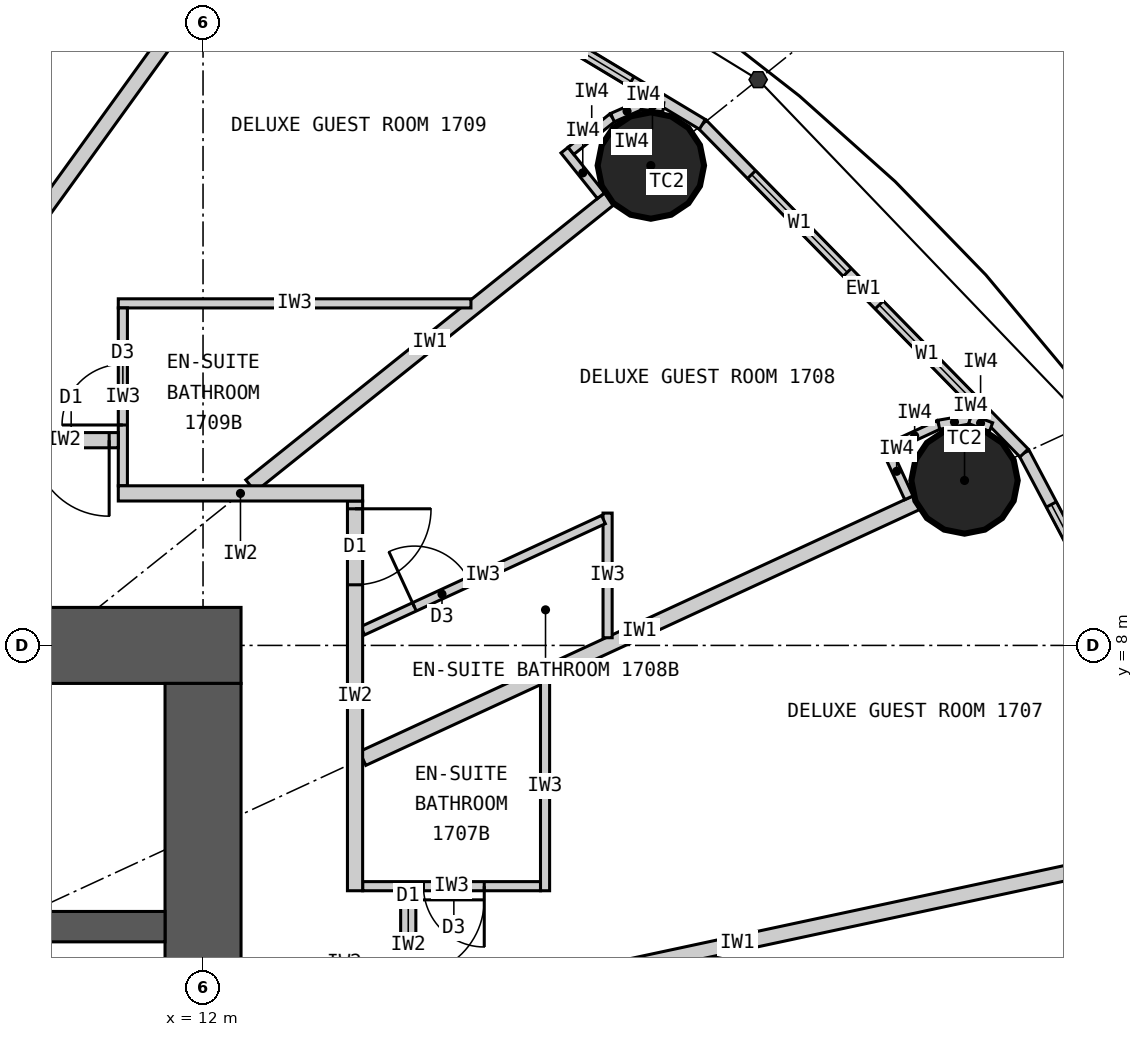
"""IFC4 building model, lengths in metres.
Left out: names, types, materials, properties, quantities, classifications, styles, units other than length and angle.
Written with IfcOpenShell. Run it as: python <this file> out.ifc"""

import sys

from ifc_helpers import new_model, si_unit, direction, frame, frame_2d, origin, origin_2d, place, context, subcontext, project, spatial, rectangle, circle, extrude, element, fill, save


model = new_model("IFC4")
c1 = context("Model", 3, precision=1e-05, world=origin(), true_north=direction((0.0, 1.0)))
c2 = subcontext(c1, "Body", "Model", "MODEL_VIEW")
j1 = project(units=[si_unit("LENGTHUNIT", "METRE"), si_unit("PLANEANGLEUNIT", "RADIAN")], contexts=[c1])
p1 = place(None, origin())
s1 = spatial("IfcSite", under=j1, at=p1, CompositionType="ELEMENT")
p2 = place(p1, origin())
s2 = spatial("IfcBuilding", under=s1, at=p2, CompositionType="ELEMENT")
p3 = place(p2, frame((0.0, 0.0, 70.5)))
s3 = spatial("IfcBuildingStorey", under=s2, at=p3, CompositionType="ELEMENT", Elevation=70.5)
for number, where, z_axis, x_axis in (
    (1, (22.019, 10.17, 0.0), (0.0, 0.0, 1.0), (1.0, 0.0, 0.0)),
    (2, (17.892, 14.313, 0.0), (0.0, 0.0, 1.0), (1.0, 0.0, 0.0)),
):
    element("IfcColumn", number, at=place(p3, frame(where, z_axis=z_axis, x_axis=x_axis)), inside=s3, PredefinedType="COLUMN", context=c2, shape_type="SweptSolid", body=[
        extrude(circle(Radius=0.7, at=origin_2d()), origin(), (0.0, 0.0, 1.0), 3.3),
    ])
p4 = place(p3, frame((-12.5, 8.0, 0.0), z_axis=(0.0, 0.0, 1.0), x_axis=(1.0, 0.0, 0.0)))
e3 = element("IfcWall", 3, at=p4, inside=s3, PredefinedType="SHEAR", context=c2, shape_type="SweptSolid", body=[
    extrude(rectangle(XDim=25.0, YDim=1.0, at=frame_2d((12.5, 0.0))), origin(), (0.0, 0.0, 1.0), 3.3),
])
p5 = place(p4, frame((11.2, 0.0, 0.0)))
e4 = element("IfcOpeningElement", 4, at=p5, cuts=e3, PredefinedType="OPENING", context=c2, shape_type="SweptSolid", body=[
    extrude(rectangle(XDim=1.2, YDim=2.2, at=frame_2d((0.6, 1.1))), frame((0.0, 0.51, 0.0), z_axis=(0.0, -1.0, 0.0), x_axis=(1.0, 0.0, 0.0)), (0.0, 0.0, 1.0), 1.02),
])
p6 = place(p4, frame((18.8, 0.0, 0.0)))
e5 = element("IfcOpeningElement", 5, at=p6, cuts=e3, PredefinedType="OPENING", context=c2, shape_type="SweptSolid", body=[
    extrude(rectangle(XDim=0.9, YDim=2.2, at=frame_2d((0.45, 1.1))), frame((0.0, 0.51, 0.0), z_axis=(0.0, -1.0, 0.0), x_axis=(1.0, 0.0, 0.0)), (0.0, 0.0, 1.0), 1.02),
])
p7 = place(p3, frame((12.0, -7.5, 0.0), z_axis=(0.0, 0.0, 1.0), x_axis=(0.0, 1.0, 0.0)))
e6 = element("IfcWall", 6, at=p7, inside=s3, PredefinedType="SHEAR", context=c2, shape_type="SweptSolid", body=[
    extrude(rectangle(XDim=15.0, YDim=1.0, at=frame_2d((7.5, 0.0))), origin(), (0.0, 0.0, 1.0), 3.3),
])
p8 = place(p7, frame((6.6, 0.0, 0.0)))
e7 = element("IfcOpeningElement", 7, at=p8, cuts=e6, PredefinedType="OPENING", context=c2, shape_type="SweptSolid", body=[
    extrude(rectangle(XDim=1.8, YDim=2.2, at=frame_2d((0.9, 1.1))), frame((0.0, 0.51, 0.0), z_axis=(0.0, -1.0, 0.0), x_axis=(1.0, 0.0, 0.0)), (0.0, 0.0, 1.0), 1.02),
])
p9 = place(p3, frame((-11.5, 4.3, 0.0), z_axis=(0.0, 0.0, 1.0), x_axis=(1.0, 0.0, 0.0)))
e8 = element("IfcWall", 8, at=p9, inside=s3, PredefinedType="SHEAR", context=c2, shape_type="SweptSolid", body=[
    extrude(rectangle(XDim=23.0, YDim=0.4, at=frame_2d((11.5, 0.0))), origin(), (0.0, 0.0, 1.0), 3.3),
])
p10 = place(p3, frame((25.482, 5.462, 0.0), z_axis=(0.0, 0.0, 1.0), x_axis=(-0.467296867008, 0.884100468321, 0.0)))
e9 = element("IfcWall", 9, at=p10, inside=s3, PredefinedType="ELEMENTEDWALL", context=c2, shape_type="SweptSolid", body=[
    extrude(rectangle(XDim=5.734, YDim=0.15, at=frame_2d((2.867, 0.0))), origin(), (0.0, 0.0, 1.0), 3.12),
])
p11 = place(p10, frame((0.767, 0.0, 0.9)))
e10 = element("IfcOpeningElement", 10, at=p11, cuts=e9, PredefinedType="OPENING", context=c2, shape_type="SweptSolid", body=[
    extrude(rectangle(XDim=1.8, YDim=1.9, at=frame_2d((0.9, 0.95))), frame((0.0, 0.085, 0.0), z_axis=(0.0, -1.0, 0.0), x_axis=(1.0, 0.0, 0.0)), (0.0, 0.0, 1.0), 0.17),
])
p12 = place(p10, frame((3.167, 0.0, 0.9)))
e11 = element("IfcOpeningElement", 11, at=p12, cuts=e9, PredefinedType="OPENING", context=c2, shape_type="SweptSolid", body=[
    extrude(rectangle(XDim=1.8, YDim=1.9, at=frame_2d((0.9, 0.95))), frame((0.0, 0.085, 0.0), z_axis=(0.0, -1.0, 0.0), x_axis=(1.0, 0.0, 0.0)), (0.0, 0.0, 1.0), 0.17),
])
p13 = place(p3, frame((22.803, 10.532, 0.0), z_axis=(0.0, 0.0, 1.0), x_axis=(-0.699602905915, 0.714531856557, 0.0)))
e12 = element("IfcWall", 12, at=p13, inside=s3, PredefinedType="ELEMENTEDWALL", context=c2, shape_type="SweptSolid", body=[
    extrude(rectangle(XDim=6.051, YDim=0.15, at=frame_2d((3.025, 0.0))), origin(), (0.0, 0.0, 1.0), 3.12),
])
p14 = place(p13, frame((0.926, 0.0, 0.9)))
e13 = element("IfcOpeningElement", 13, at=p14, cuts=e12, PredefinedType="OPENING", context=c2, shape_type="SweptSolid", body=[
    extrude(rectangle(XDim=1.8, YDim=1.9, at=frame_2d((0.9, 0.95))), frame((0.0, 0.085, 0.0), z_axis=(0.0, -1.0, 0.0), x_axis=(1.0, 0.0, 0.0)), (0.0, 0.0, 1.0), 0.17),
])
p15 = place(p13, frame((3.325, 0.0, 0.9)))
e14 = element("IfcOpeningElement", 14, at=p15, cuts=e12, PredefinedType="OPENING", context=c2, shape_type="SweptSolid", body=[
    extrude(rectangle(XDim=1.8, YDim=1.9, at=frame_2d((0.9, 0.95))), frame((0.0, 0.085, 0.0), z_axis=(0.0, -1.0, 0.0), x_axis=(1.0, 0.0, 0.0)), (0.0, 0.0, 1.0), 0.17),
])
p16 = place(p3, frame((18.57, 14.856, 0.0), z_axis=(0.0, 0.0, 1.0), x_axis=(-0.856983180864, 0.515344377787, 0.0)))
e15 = element("IfcWall", 15, at=p16, inside=s3, PredefinedType="ELEMENTEDWALL", context=c2, shape_type="SweptSolid", body=[
    extrude(rectangle(XDim=6.386, YDim=0.15, at=frame_2d((3.193, 0.0))), origin(), (0.0, 0.0, 1.0), 3.12),
])
p17 = place(p16, frame((1.093, 0.0, 0.9)))
e16 = element("IfcOpeningElement", 16, at=p17, cuts=e15, PredefinedType="OPENING", context=c2, shape_type="SweptSolid", body=[
    extrude(rectangle(XDim=1.8, YDim=1.9, at=frame_2d((0.9, 0.95))), frame((0.0, 0.085, 0.0), z_axis=(0.0, -1.0, 0.0), x_axis=(1.0, 0.0, 0.0)), (0.0, 0.0, 1.0), 0.17),
])
p18 = place(p16, frame((3.493, 0.0, 0.9)))
e17 = element("IfcOpeningElement", 17, at=p18, cuts=e15, PredefinedType="OPENING", context=c2, shape_type="SweptSolid", body=[
    extrude(rectangle(XDim=1.8, YDim=1.9, at=frame_2d((0.9, 0.95))), frame((0.0, 0.085, 0.0), z_axis=(0.0, -1.0, 0.0), x_axis=(1.0, 0.0, 0.0)), (0.0, 0.0, 1.0), 0.17),
])
p19 = place(p3, frame((14.1, 3.022, 0.0), z_axis=(0.0, 0.0, 1.0), x_axis=(0.977790014929, 0.209586943072, 0.0)))
e18 = element("IfcWall", 18, at=p19, inside=s3, PredefinedType="PARTITIONING", context=c2, shape_type="SweptSolid", body=[
    extrude(rectangle(XDim=10.087, YDim=0.2, at=frame_2d((5.043, 0.0))), origin(), (0.0, 0.0, 1.0), 2.32),
])
p20 = place(p3, frame((14.1, 6.512, 0.0), z_axis=(0.0, 0.0, 1.0), x_axis=(0.907832871056, 0.419332181247, 0.0)))
e19 = element("IfcWall", 19, at=p20, inside=s3, PredefinedType="PARTITIONING", context=c2, shape_type="SweptSolid", body=[
    extrude(rectangle(XDim=8.023, YDim=0.2, at=frame_2d((4.011, 0.0))), origin(), (0.0, 0.0, 1.0), 2.32),
])
p21 = place(p3, frame((12.625, 10.1, 0.0), z_axis=(0.0, 0.0, 1.0), x_axis=(0.780892451574, 0.624665493744, 0.0)))
e20 = element("IfcWall", 20, at=p21, inside=s3, PredefinedType="PARTITIONING", context=c2, shape_type="SweptSolid", body=[
    extrude(rectangle(XDim=6.045, YDim=0.2, at=frame_2d((3.022, 0.0))), origin(), (0.0, 0.0, 1.0), 2.32),
])
p22 = place(p3, frame((7.289, 10.1, 0.0), z_axis=(0.0, 0.0, 1.0), x_axis=(0.585198353053, 0.810890182197, 0.0)))
e21 = element("IfcWall", 21, at=p22, inside=s3, PredefinedType="PARTITIONING", context=c2, shape_type="SweptSolid", body=[
    extrude(rectangle(XDim=8.36, YDim=0.2, at=frame_2d((4.18, 0.0))), origin(), (0.0, 0.0, 1.0), 2.32),
])
p23 = place(p3, frame((16.5, 7.521, 0.0), z_axis=(0.0, 0.0, 1.0), x_axis=(0.0, -1.0, 0.0)))
e22 = element("IfcWall", 22, at=p23, inside=s3, PredefinedType="PARTITIONING", context=c2, shape_type="SweptSolid", body=[
    extrude(rectangle(XDim=2.749, YDim=0.12, at=frame_2d((1.374, 0.0))), origin(), (0.0, 0.0, 1.0), 3.12),
])
p24 = place(p3, frame((14.1, 4.833, 0.0), z_axis=(0.0, 0.0, 1.0), x_axis=(1.0, 0.0, 0.0)))
e23 = element("IfcWall", 23, at=p24, inside=s3, PredefinedType="PARTITIONING", context=c2, shape_type="SweptSolid", body=[
    extrude(rectangle(XDim=2.34, YDim=0.12, at=frame_2d((1.17, 0.0))), origin(), (0.0, 0.0, 1.0), 3.12),
])
p25 = place(p24, frame((0.8, 0.0, 0.0)))
e24 = element("IfcOpeningElement", 24, at=p25, cuts=e23, PredefinedType="OPENING", context=c2, shape_type="SweptSolid", body=[
    extrude(rectangle(XDim=0.8, YDim=2.1, at=frame_2d((0.4, 1.05))), frame((0.0, 0.07, 0.0), z_axis=(0.0, -1.0, 0.0), x_axis=(1.0, 0.0, 0.0)), (0.0, 0.0, 1.0), 0.14),
])
p26 = place(p3, frame((17.323, 8.101, 0.0), z_axis=(0.0, 0.0, 1.0), x_axis=(0.0, 1.0, 0.0)))
e25 = element("IfcWall", 25, at=p26, inside=s3, PredefinedType="PARTITIONING", context=c2, shape_type="SweptSolid", body=[
    extrude(rectangle(XDim=1.64, YDim=0.12, at=frame_2d((0.82, 0.0))), origin(), (0.0, 0.0, 1.0), 3.12),
])
p27 = place(p3, frame((14.1, 8.193, 0.0), z_axis=(0.0, 0.0, 1.0), x_axis=(0.907836493557, 0.419324338628, 0.0)))
e26 = element("IfcWall", 26, at=p27, inside=s3, PredefinedType="PARTITIONING", context=c2, shape_type="SweptSolid", body=[
    extrude(rectangle(XDim=3.49, YDim=0.12, at=frame_2d((1.745, 0.0))), origin(), (0.0, 0.0, 1.0), 3.12),
])
p28 = place(p27, frame((0.75, 0.0, 0.0)))
e27 = element("IfcOpeningElement", 27, at=p28, cuts=e26, PredefinedType="OPENING", context=c2, shape_type="SweptSolid", body=[
    extrude(rectangle(XDim=0.8, YDim=2.1, at=frame_2d((0.4, 1.05))), frame((0.0, 0.07, 0.0), z_axis=(0.0, -1.0, 0.0), x_axis=(1.0, 0.0, 0.0)), (0.0, 0.0, 1.0), 0.14),
])
p29 = place(p3, frame((15.525, 12.5, 0.0), z_axis=(0.0, 0.0, 1.0), x_axis=(-1.0, 0.0, 0.0)))
e28 = element("IfcWall", 28, at=p29, inside=s3, PredefinedType="PARTITIONING", context=c2, shape_type="SweptSolid", body=[
    extrude(rectangle(XDim=4.64, YDim=0.12, at=frame_2d((2.32, 0.0))), origin(), (0.0, 0.0, 1.0), 3.12),
])
p30 = place(p3, frame((10.945, 10.1, 0.0), z_axis=(0.0, 0.0, 1.0), x_axis=(0.0, 1.0, 0.0)))
e29 = element("IfcWall", 29, at=p30, inside=s3, PredefinedType="PARTITIONING", context=c2, shape_type="SweptSolid", body=[
    extrude(rectangle(XDim=2.34, YDim=0.12, at=frame_2d((1.17, 0.0))), origin(), (0.0, 0.0, 1.0), 3.12),
])
p31 = place(p30, frame((0.8, 0.0, 0.0)))
e30 = element("IfcOpeningElement", 30, at=p31, cuts=e29, PredefinedType="OPENING", context=c2, shape_type="SweptSolid", body=[
    extrude(rectangle(XDim=0.8, YDim=2.1, at=frame_2d((0.4, 1.05))), frame((0.0, 0.07, 0.0), z_axis=(0.0, -1.0, 0.0), x_axis=(1.0, 0.0, 0.0)), (0.0, 0.0, 1.0), 0.14),
])
p32 = place(p3, frame((14.7, 3.333, 0.0), z_axis=(0.0, 0.0, 1.0), x_axis=(0.0, 1.0, 0.0)))
e31 = element("IfcWall", 31, at=p32, inside=s3, PredefinedType="PARTITIONING", context=c2, shape_type="SweptSolid", body=[
    extrude(rectangle(XDim=1.44, YDim=0.2, at=frame_2d((0.72, 0.0))), origin(), (0.0, 0.0, 1.0), 3.12),
])
p33 = place(p32, frame((0.32, 0.0, 0.0)))
e32 = element("IfcOpeningElement", 32, at=p33, cuts=e31, PredefinedType="OPENING", context=c2, shape_type="SweptSolid", body=[
    extrude(rectangle(XDim=1.0, YDim=2.2, at=frame_2d((0.5, 1.1))), frame((0.0, 0.11, 0.0), z_axis=(0.0, -1.0, 0.0), x_axis=(1.0, 0.0, 0.0)), (0.0, 0.0, 1.0), 0.22),
])
p34 = place(p3, frame((9.445, 10.7, 0.0), z_axis=(0.0, 0.0, 1.0), x_axis=(1.0, 0.0, 0.0)))
e33 = element("IfcWall", 33, at=p34, inside=s3, PredefinedType="PARTITIONING", context=c2, shape_type="SweptSolid", body=[
    extrude(rectangle(XDim=1.44, YDim=0.2, at=frame_2d((0.72, 0.0))), origin(), (0.0, 0.0, 1.0), 3.12),
])
p35 = place(p34, frame((0.32, 0.0, 0.0)))
e34 = element("IfcOpeningElement", 34, at=p35, cuts=e33, PredefinedType="OPENING", context=c2, shape_type="SweptSolid", body=[
    extrude(rectangle(XDim=1.0, YDim=2.2, at=frame_2d((0.5, 1.1))), frame((0.0, 0.11, 0.0), z_axis=(0.0, -1.0, 0.0), x_axis=(1.0, 0.0, 0.0)), (0.0, 0.0, 1.0), 0.22),
])
p36 = place(p3, frame((14.0, 4.772, 0.0), z_axis=(0.0, 0.0, 1.0), x_axis=(0.0, 1.0, 0.0)))
e35 = element("IfcWall", 35, at=p36, inside=s3, PredefinedType="PARTITIONING", context=c2, shape_type="SweptSolid", body=[
    extrude(rectangle(XDim=5.127, YDim=0.2, at=frame_2d((2.564, 0.0))), origin(), (0.0, 0.0, 1.0), 3.12),
])
p37 = place(p36, frame((4.025, 0.0, 0.0)))
e36 = element("IfcOpeningElement", 36, at=p37, cuts=e35, PredefinedType="OPENING", context=c2, shape_type="SweptSolid", body=[
    extrude(rectangle(XDim=1.0, YDim=2.2, at=frame_2d((0.5, 1.1))), frame((0.0, 0.11, 0.0), z_axis=(0.0, -1.0, 0.0), x_axis=(1.0, 0.0, 0.0)), (0.0, 0.0, 1.0), 0.22),
])
p38 = place(p3, frame((10.885, 10.0, 0.0), z_axis=(0.0, 0.0, 1.0), x_axis=(1.0, 0.0, 0.0)))
e37 = element("IfcWall", 37, at=p38, inside=s3, PredefinedType="PARTITIONING", context=c2, shape_type="SweptSolid", body=[
    extrude(rectangle(XDim=3.215, YDim=0.2, at=frame_2d((1.607, 0.0))), origin(), (0.0, 0.0, 1.0), 3.12),
])
p39 = place(p3, frame((21.287, 9.942, 0.0), z_axis=(0.0, 0.0, 1.0), x_axis=(-0.419259891039, 0.907866258744, 0.0)))
e38 = element("IfcWall", 38, at=p39, inside=s3, PredefinedType="PARTITIONING", context=c2, shape_type="SweptSolid", body=[
    extrude(rectangle(XDim=0.768, YDim=0.12, at=frame_2d((0.384, 0.0))), origin(), (0.0, 0.0, 1.0), 3.12),
])
p40 = place(p3, frame((21.045, 10.61, 0.0), z_axis=(0.0, 0.0, 1.0), x_axis=(0.907877701396, 0.419235112208, 0.0)))
e39 = element("IfcWall", 39, at=p40, inside=s3, PredefinedType="PARTITIONING", context=c2, shape_type="SweptSolid", body=[
    extrude(rectangle(XDim=0.7, YDim=0.12, at=frame_2d((0.35, 0.0))), origin(), (0.0, 0.0, 1.0), 3.12),
])
p41 = place(p3, frame((21.68, 10.903, 0.0), z_axis=(0.0, 0.0, 1.0), x_axis=(0.985446622073, 0.169985161247, 0.0)))
e40 = element("IfcWall", 40, at=p41, inside=s3, PredefinedType="PARTITIONING", context=c2, shape_type="SweptSolid", body=[
    extrude(rectangle(XDim=0.418, YDim=0.12, at=frame_2d((0.209, 0.0))), origin(), (0.0, 0.0, 1.0), 3.12),
])
p42 = place(p3, frame((22.092, 10.974, 0.0), z_axis=(0.0, 0.0, 1.0), x_axis=(0.938428160676, -0.345474437912, 0.0)))
e41 = element("IfcWall", 41, at=p42, inside=s3, PredefinedType="PARTITIONING", context=c2, shape_type="SweptSolid", body=[
    extrude(rectangle(XDim=0.294, YDim=0.12, at=frame_2d((0.147, 0.0))), origin(), (0.0, 0.0, 1.0), 3.12),
])
p43 = place(p3, frame((17.236, 13.917, 0.0), z_axis=(0.0, 0.0, 1.0), x_axis=(-0.624695047554, 0.780868809443, 0.0)))
e42 = element("IfcWall", 42, at=p43, inside=s3, PredefinedType="PARTITIONING", context=c2, shape_type="SweptSolid", body=[
    extrude(rectangle(XDim=0.768, YDim=0.12, at=frame_2d((0.384, 0.0))), origin(), (0.0, 0.0, 1.0), 3.12),
])
p44 = place(p3, frame((16.841, 14.507, 0.0), z_axis=(0.0, 0.0, 1.0), x_axis=(0.780902834923, 0.62465251333, 0.0)))
e43 = element("IfcWall", 43, at=p44, inside=s3, PredefinedType="PARTITIONING", context=c2, shape_type="SweptSolid", body=[
    extrude(rectangle(XDim=0.7, YDim=0.12, at=frame_2d((0.35, 0.0))), origin(), (0.0, 0.0, 1.0), 3.12),
])
p45 = place(p3, frame((17.387, 14.944, 0.0), z_axis=(0.0, 0.0, 1.0), x_axis=(0.916036698064, 0.401094462441, 0.0)))
e44 = element("IfcWall", 44, at=p45, inside=s3, PredefinedType="PARTITIONING", context=c2, shape_type="SweptSolid", body=[
    extrude(rectangle(XDim=0.418, YDim=0.12, at=frame_2d((0.209, 0.0))), origin(), (0.0, 0.0, 1.0), 3.12),
])
p46 = place(p3, frame((17.77, 15.112, 0.0), z_axis=(0.0, 0.0, 1.0), x_axis=(0.993904401174, -0.110245368731, 0.0)))
e45 = element("IfcWall", 45, at=p46, inside=s3, PredefinedType="PARTITIONING", context=c2, shape_type="SweptSolid", body=[
    extrude(rectangle(XDim=0.288, YDim=0.12, at=frame_2d((0.144, 0.0))), origin(), (0.0, 0.0, 1.0), 3.12),
])
p47 = place(p12, origin())
e46 = element("IfcWindow", 46, at=p47, inside=s3, PartitioningType="SINGLE_PANEL", PredefinedType="WINDOW", context=c2, shape_type="SweptSolid", body=[
    extrude(rectangle(XDim=1.8, YDim=1.9, at=frame_2d((0.9, 0.95))), frame((0.0, 0.03, 0.0), z_axis=(0.0, -1.0, 0.0), x_axis=(1.0, 0.0, 0.0)), (0.0, 0.0, 1.0), 0.06),
])
fill(e11, e46)
p48 = place(p14, origin())
e47 = element("IfcWindow", 47, at=p48, inside=s3, PartitioningType="SINGLE_PANEL", PredefinedType="WINDOW", context=c2, shape_type="SweptSolid", body=[
    extrude(rectangle(XDim=1.8, YDim=1.9, at=frame_2d((0.9, 0.95))), frame((0.0, 0.03, 0.0), z_axis=(0.0, -1.0, 0.0), x_axis=(1.0, 0.0, 0.0)), (0.0, 0.0, 1.0), 0.06),
])
fill(e13, e47)
p49 = place(p15, origin())
e48 = element("IfcWindow", 48, at=p49, inside=s3, PartitioningType="SINGLE_PANEL", PredefinedType="WINDOW", context=c2, shape_type="SweptSolid", body=[
    extrude(rectangle(XDim=1.8, YDim=1.9, at=frame_2d((0.9, 0.95))), frame((0.0, 0.03, 0.0), z_axis=(0.0, -1.0, 0.0), x_axis=(1.0, 0.0, 0.0)), (0.0, 0.0, 1.0), 0.06),
])
fill(e14, e48)
p50 = place(p17, origin())
e49 = element("IfcWindow", 49, at=p50, inside=s3, PartitioningType="SINGLE_PANEL", PredefinedType="WINDOW", context=c2, shape_type="SweptSolid", body=[
    extrude(rectangle(XDim=1.8, YDim=1.9, at=frame_2d((0.9, 0.95))), frame((0.0, 0.03, 0.0), z_axis=(0.0, -1.0, 0.0), x_axis=(1.0, 0.0, 0.0)), (0.0, 0.0, 1.0), 0.06),
])
fill(e16, e49)
p51 = place(p25, origin())
e50 = element("IfcDoor", 50, at=p51, inside=s3, OperationType="SINGLE_SWING_RIGHT", PredefinedType="DOOR", context=c2, shape_type="SweptSolid", body=[
    extrude(rectangle(XDim=0.8, YDim=2.1, at=frame_2d((0.4, 1.05))), frame((0.0, 0.025, 0.0), z_axis=(0.0, -1.0, 0.0), x_axis=(1.0, 0.0, 0.0)), (0.0, 0.0, 1.0), 0.05),
])
fill(e24, e50)
p52 = place(p33, origin())
e51 = element("IfcDoor", 51, at=p52, inside=s3, OperationType="SINGLE_SWING_RIGHT", PredefinedType="DOOR", context=c2, shape_type="SweptSolid", body=[
    extrude(rectangle(XDim=1.0, YDim=2.2, at=frame_2d((0.5, 1.1))), frame((0.0, 0.025, 0.0), z_axis=(0.0, -1.0, 0.0), x_axis=(1.0, 0.0, 0.0)), (0.0, 0.0, 1.0), 0.05),
])
fill(e32, e51)
p53 = place(p28, origin())
e52 = element("IfcDoor", 52, at=p53, inside=s3, OperationType="SINGLE_SWING_LEFT", PredefinedType="DOOR", context=c2, shape_type="SweptSolid", body=[
    extrude(rectangle(XDim=0.8, YDim=2.1, at=frame_2d((0.4, 1.05))), frame((0.0, 0.025, 0.0), z_axis=(0.0, -1.0, 0.0), x_axis=(1.0, 0.0, 0.0)), (0.0, 0.0, 1.0), 0.05),
])
fill(e27, e52)
p54 = place(p37, origin())
e53 = element("IfcDoor", 53, at=p54, inside=s3, OperationType="SINGLE_SWING_RIGHT", PredefinedType="DOOR", context=c2, shape_type="SweptSolid", body=[
    extrude(rectangle(XDim=1.0, YDim=2.2, at=frame_2d((0.5, 1.1))), frame((0.0, 0.025, 0.0), z_axis=(0.0, -1.0, 0.0), x_axis=(1.0, 0.0, 0.0)), (0.0, 0.0, 1.0), 0.05),
])
fill(e36, e53)
p55 = place(p31, origin())
e54 = element("IfcDoor", 54, at=p55, inside=s3, OperationType="SINGLE_SWING_LEFT", PredefinedType="DOOR", context=c2, shape_type="SweptSolid", body=[
    extrude(rectangle(XDim=0.8, YDim=2.1, at=frame_2d((0.4, 1.05))), frame((0.0, 0.025, 0.0), z_axis=(0.0, -1.0, 0.0), x_axis=(1.0, 0.0, 0.0)), (0.0, 0.0, 1.0), 0.05),
])
fill(e30, e54)
p56 = place(p35, origin())
e55 = element("IfcDoor", 55, at=p56, inside=s3, OperationType="SINGLE_SWING_RIGHT", PredefinedType="DOOR", context=c2, shape_type="SweptSolid", body=[
    extrude(rectangle(XDim=1.0, YDim=2.2, at=frame_2d((0.5, 1.1))), frame((0.0, 0.025, 0.0), z_axis=(0.0, -1.0, 0.0), x_axis=(1.0, 0.0, 0.0)), (0.0, 0.0, 1.0), 0.05),
])
fill(e34, e55)
save(model, sys.argv[1])
